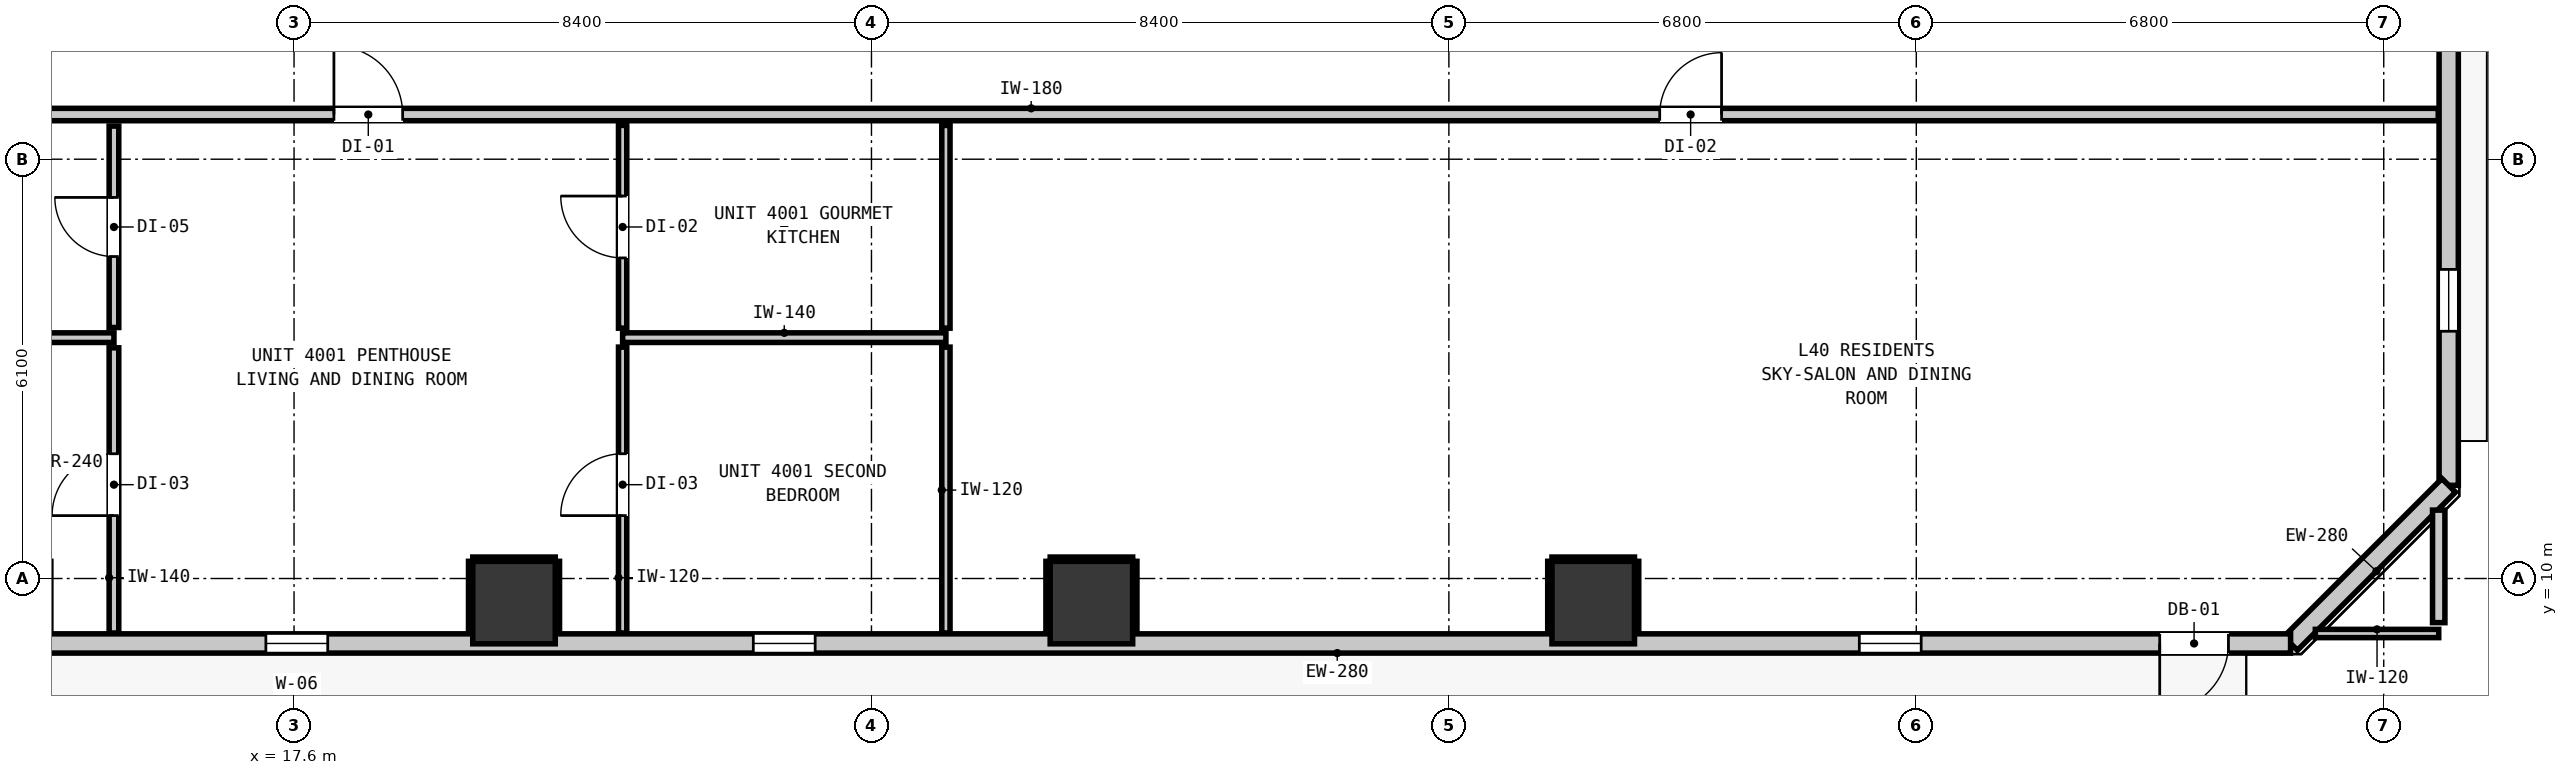
"""IFC4 building model, lengths in metres.
Left out: names, types, materials, properties, quantities, classifications, styles, units other than length and angle.
Written with IfcOpenShell. Run it as: python <this file> out.ifc"""

import sys

from ifc_helpers import new_model, si_unit, direction, frame, frame_2d, origin, origin_2d, place, context, subcontext, project, spatial, rectangle, extrude, element, fill, save


model = new_model("IFC4")
c1 = context("Model", 3, precision=1e-05, world=origin(), true_north=direction((0.0, 1.0)))
c2 = subcontext(c1, "Body", "Model", "MODEL_VIEW")
j1 = project(units=[si_unit("LENGTHUNIT", "METRE"), si_unit("PLANEANGLEUNIT", "RADIAN")], contexts=[c1])
p1 = place(None, origin())
s1 = spatial("IfcSite", under=j1, at=p1, CompositionType="ELEMENT")
p2 = place(p1, origin())
s2 = spatial("IfcBuilding", under=s1, at=p2, CompositionType="ELEMENT")
p3 = place(p2, frame((0.0, 0.0, 139.28)))
s3 = spatial("IfcBuildingStorey", under=s2, at=p3, CompositionType="ELEMENT", Elevation=139.28)
for number, where, z_axis, x_axis in (
    (1, (20.8, 9.65, 0.0), (0.0, 0.0, 1.0), (1.0, 0.0, 0.0)),
    (2, (29.2, 9.65, 0.0), (0.0, 0.0, 1.0), (1.0, 0.0, 0.0)),
    (3, (36.5, 9.65, 0.0), (0.0, 0.0, 1.0), (1.0, 0.0, 0.0)),
):
    element("IfcColumn", number, at=place(p3, frame(where, z_axis=z_axis, x_axis=x_axis)), inside=s3, PredefinedType="COLUMN", context=c2, shape_type="SweptSolid", body=[
        extrude(rectangle(XDim=1.2, YDim=1.2, at=origin_2d()), origin(), (0.0, 0.0, 1.0), 3.32),
    ])
p4 = place(p3, frame((48.945, 43.645, 0.0), z_axis=(0.0, 0.0, 1.0), x_axis=(0.0, -1.0, 0.0)))
e4 = element("IfcWall", 4, at=p4, inside=s3, PredefinedType="STANDARD", context=c2, shape_type="SweptSolid", body=[
    extrude(rectangle(XDim=32.29, YDim=0.28, at=frame_2d((16.145, 0.0))), origin(), (0.0, 0.0, 1.0), 3.08),
])
p5 = place(p4, frame((5.467, 0.0, 0.0)))
e5 = element("IfcOpeningElement", 5, at=p5, cuts=e4, PredefinedType="OPENING", context=c2, shape_type="SweptSolid", body=[
    extrude(rectangle(XDim=1.0, YDim=2.15, at=frame_2d((0.5, 1.075))), frame((0.0, 0.15, 0.0), z_axis=(0.0, -1.0, 0.0), x_axis=(1.0, 0.0, 0.0)), (0.0, 0.0, 1.0), 0.3),
])
p6 = place(p4, frame((29.148, 0.0, 0.85)))
e6 = element("IfcOpeningElement", 6, at=p6, cuts=e4, PredefinedType="OPENING", context=c2, shape_type="SweptSolid", body=[
    extrude(rectangle(XDim=0.9, YDim=1.5, at=frame_2d((0.45, 0.75))), frame((0.0, 0.15, 0.0), z_axis=(0.0, -1.0, 0.0), x_axis=(1.0, 0.0, 0.0)), (0.0, 0.0, 1.0), 0.3),
])
p7 = place(p4, frame((0.393, 0.0, 0.85)))
e7 = element("IfcOpeningElement", 7, at=p7, cuts=e4, PredefinedType="OPENING", context=c2, shape_type="SweptSolid", body=[
    extrude(rectangle(XDim=0.9, YDim=1.5, at=frame_2d((0.45, 0.75))), frame((0.0, 0.15, 0.0), z_axis=(0.0, -1.0, 0.0), x_axis=(1.0, 0.0, 0.0)), (0.0, 0.0, 1.0), 0.3),
])
p8 = place(p4, frame((16.276, 0.0, 0.85)))
e8 = element("IfcOpeningElement", 8, at=p8, cuts=e4, PredefinedType="OPENING", context=c2, shape_type="SweptSolid", body=[
    extrude(rectangle(XDim=0.9, YDim=1.5, at=frame_2d((0.45, 0.75))), frame((0.0, 0.15, 0.0), z_axis=(0.0, -1.0, 0.0), x_axis=(1.0, 0.0, 0.0)), (0.0, 0.0, 1.0), 0.3),
])
p9 = place(p4, frame((10.645, 0.0, 0.85)))
e9 = element("IfcOpeningElement", 9, at=p9, cuts=e4, PredefinedType="OPENING", context=c2, shape_type="SweptSolid", body=[
    extrude(rectangle(XDim=0.9, YDim=1.5, at=frame_2d((0.45, 0.75))), frame((0.0, 0.15, 0.0), z_axis=(0.0, -1.0, 0.0), x_axis=(1.0, 0.0, 0.0)), (0.0, 0.0, 1.0), 0.3),
])
p10 = place(p3, frame((48.945, 11.355, 0.0), z_axis=(0.0, 0.0, 1.0), x_axis=(-0.707106781187, -0.707106781187, 0.0)))
e10 = element("IfcWall", 10, at=p10, inside=s3, PredefinedType="STANDARD", context=c2, shape_type="SweptSolid", body=[
    extrude(rectangle(XDim=3.253, YDim=0.28, at=frame_2d((1.626, 0.0))), origin(), (0.0, 0.0, 1.0), 3.08),
])
p11 = place(p3, frame((46.645, 9.055, 0.0), z_axis=(0.0, 0.0, 1.0), x_axis=(-1.0, 0.0, 0.0)))
e11 = element("IfcWall", 11, at=p11, inside=s3, PredefinedType="STANDARD", context=c2, shape_type="SweptSolid", body=[
    extrude(rectangle(XDim=35.09, YDim=0.28, at=frame_2d((17.545, 0.0))), origin(), (0.0, 0.0, 1.0), 3.08),
])
p12 = place(p11, frame((0.904, 0.0, 0.0)))
e12 = element("IfcOpeningElement", 12, at=p12, cuts=e11, PredefinedType="OPENING", context=c2, shape_type="SweptSolid", body=[
    extrude(rectangle(XDim=1.0, YDim=2.15, at=frame_2d((0.5, 1.075))), frame((0.0, 0.15, 0.0), z_axis=(0.0, -1.0, 0.0), x_axis=(1.0, 0.0, 0.0)), (0.0, 0.0, 1.0), 0.3),
])
p13 = place(p11, frame((28.555, 0.0, 0.85)))
e13 = element("IfcOpeningElement", 13, at=p13, cuts=e11, PredefinedType="OPENING", context=c2, shape_type="SweptSolid", body=[
    extrude(rectangle(XDim=0.9, YDim=1.5, at=frame_2d((0.45, 0.75))), frame((0.0, 0.15, 0.0), z_axis=(0.0, -1.0, 0.0), x_axis=(1.0, 0.0, 0.0)), (0.0, 0.0, 1.0), 0.3),
])
p14 = place(p11, frame((34.133, 0.0, 0.85)))
e14 = element("IfcOpeningElement", 14, at=p14, cuts=e11, PredefinedType="OPENING", context=c2, shape_type="SweptSolid", body=[
    extrude(rectangle(XDim=0.58, YDim=1.5, at=frame_2d((0.29, 0.75))), frame((0.0, 0.15, 0.0), z_axis=(0.0, -1.0, 0.0), x_axis=(1.0, 0.0, 0.0)), (0.0, 0.0, 1.0), 0.3),
])
p15 = place(p11, frame((21.464, 0.0, 0.85)))
e15 = element("IfcOpeningElement", 15, at=p15, cuts=e11, PredefinedType="OPENING", context=c2, shape_type="SweptSolid", body=[
    extrude(rectangle(XDim=0.9, YDim=1.5, at=frame_2d((0.45, 0.75))), frame((0.0, 0.15, 0.0), z_axis=(0.0, -1.0, 0.0), x_axis=(1.0, 0.0, 0.0)), (0.0, 0.0, 1.0), 0.3),
])
p16 = place(p11, frame((5.374, 0.0, 0.85)))
e16 = element("IfcOpeningElement", 16, at=p16, cuts=e11, PredefinedType="OPENING", context=c2, shape_type="SweptSolid", body=[
    extrude(rectangle(XDim=0.9, YDim=1.5, at=frame_2d((0.45, 0.75))), frame((0.0, 0.15, 0.0), z_axis=(0.0, -1.0, 0.0), x_axis=(1.0, 0.0, 0.0)), (0.0, 0.0, 1.0), 0.3),
])
p17 = place(p3, frame((9.407, 16.75, 0.0), z_axis=(0.0, 0.0, 1.0), x_axis=(1.0, 0.0, 0.0)))
e17 = element("IfcWall", 17, at=p17, inside=s3, PredefinedType="PARTITIONING", context=c2, shape_type="SweptSolid", body=[
    extrude(rectangle(XDim=39.386, YDim=0.18, at=frame_2d((19.693, 0.0))), origin(), (0.0, 0.0, 1.0), 3.08),
])
p18 = place(p17, frame((8.773, 0.0, 0.0)))
e18 = element("IfcOpeningElement", 18, at=p18, cuts=e17, PredefinedType="OPENING", context=c2, shape_type="SweptSolid", body=[
    extrude(rectangle(XDim=1.0, YDim=2.15, at=frame_2d((0.5, 1.075))), frame((0.0, 0.1, 0.0), z_axis=(0.0, -1.0, 0.0), x_axis=(1.0, 0.0, 0.0)), (0.0, 0.0, 1.0), 0.2),
])
p19 = place(p17, frame((28.06, 0.0, 0.0)))
e19 = element("IfcOpeningElement", 19, at=p19, cuts=e17, PredefinedType="OPENING", context=c2, shape_type="SweptSolid", body=[
    extrude(rectangle(XDim=0.9, YDim=2.1, at=frame_2d((0.45, 1.05))), frame((0.0, 0.1, 0.0), z_axis=(0.0, -1.0, 0.0), x_axis=(1.0, 0.0, 0.0)), (0.0, 0.0, 1.0), 0.2),
])
p20 = place(p3, frame((9.407, 13.504, 0.0), z_axis=(0.0, 0.0, 1.0), x_axis=(1.0, 0.0, 0.0)))
e20 = element("IfcWall", 20, at=p20, inside=s3, PredefinedType="PARTITIONING", context=c2, shape_type="SweptSolid", body=[
    extrude(rectangle(XDim=5.573, YDim=0.14, at=frame_2d((2.787, 0.0))), origin(), (0.0, 0.0, 1.0), 3.08),
])
p21 = place(p3, frame((22.38, 13.504, 0.0), z_axis=(0.0, 0.0, 1.0), x_axis=(1.0, 0.0, 0.0)))
e21 = element("IfcWall", 21, at=p21, inside=s3, PredefinedType="PARTITIONING", context=c2, shape_type="SweptSolid", body=[
    extrude(rectangle(XDim=4.703, YDim=0.14, at=frame_2d((2.352, 0.0))), origin(), (0.0, 0.0, 1.0), 3.08),
])
p22 = place(p3, frame((47.005, 9.2, 0.0), z_axis=(0.0, 0.0, 1.0), x_axis=(1.0, 0.0, 0.0)))
e22 = element("IfcWall", 22, at=p22, inside=s3, PredefinedType="PARTITIONING", context=c2, shape_type="SweptSolid", body=[
    extrude(rectangle(XDim=1.795, YDim=0.12, at=frame_2d((0.897, 0.0))), origin(), (0.0, 0.0, 1.0), 3.08),
])
p23 = place(p3, frame((48.8, 9.358, 0.0), z_axis=(0.0, 0.0, 1.0), x_axis=(0.0, 1.0, 0.0)))
e23 = element("IfcWall", 23, at=p23, inside=s3, PredefinedType="PARTITIONING", context=c2, shape_type="SweptSolid", body=[
    extrude(rectangle(XDim=1.637, YDim=0.18, at=frame_2d((0.819, 0.0))), origin(), (0.0, 0.0, 1.0), 3.08),
])
p24 = place(p3, frame((14.98, 9.207, 0.0), z_axis=(0.0, 0.0, 1.0), x_axis=(0.0, 1.0, 0.0)))
e24 = element("IfcWall", 24, at=p24, inside=s3, PredefinedType="PARTITIONING", context=c2, shape_type="SweptSolid", body=[
    extrude(rectangle(XDim=4.149, YDim=0.14, at=frame_2d((2.074, 0.0))), origin(), (0.0, 0.0, 1.0), 3.08),
])
p25 = place(p24, frame((1.708, 0.0, 0.0)))
e25 = element("IfcOpeningElement", 25, at=p25, cuts=e24, PredefinedType="OPENING", context=c2, shape_type="SweptSolid", body=[
    extrude(rectangle(XDim=0.9, YDim=2.1, at=frame_2d((0.45, 1.05))), frame((0.0, 0.08, 0.0), z_axis=(0.0, -1.0, 0.0), x_axis=(1.0, 0.0, 0.0)), (0.0, 0.0, 1.0), 0.16),
])
p26 = place(p3, frame((14.98, 13.652, 0.0), z_axis=(0.0, 0.0, 1.0), x_axis=(0.0, 1.0, 0.0)))
e26 = element("IfcWall", 26, at=p26, inside=s3, PredefinedType="PARTITIONING", context=c2, shape_type="SweptSolid", body=[
    extrude(rectangle(XDim=2.93, YDim=0.14, at=frame_2d((1.465, 0.0))), origin(), (0.0, 0.0, 1.0), 3.08),
])
p27 = place(p26, frame((1.032, 0.0, 0.0)))
e27 = element("IfcOpeningElement", 27, at=p27, cuts=e26, PredefinedType="OPENING", context=c2, shape_type="SweptSolid", body=[
    extrude(rectangle(XDim=0.86, YDim=2.02, at=frame_2d((0.43, 1.01))), frame((0.0, 0.08, 0.0), z_axis=(0.0, -1.0, 0.0), x_axis=(1.0, 0.0, 0.0)), (0.0, 0.0, 1.0), 0.16),
])
p28 = place(p3, frame((22.38, 9.207, 0.0), z_axis=(0.0, 0.0, 1.0), x_axis=(0.0, 1.0, 0.0)))
e28 = element("IfcWall", 28, at=p28, inside=s3, PredefinedType="PARTITIONING", context=c2, shape_type="SweptSolid", body=[
    extrude(rectangle(XDim=4.159, YDim=0.12, at=frame_2d((2.08, 0.0))), origin(), (0.0, 0.0, 1.0), 3.08),
])
p29 = place(p28, frame((1.708, 0.0, 0.0)))
e29 = element("IfcOpeningElement", 29, at=p29, cuts=e28, PredefinedType="OPENING", context=c2, shape_type="SweptSolid", body=[
    extrude(rectangle(XDim=0.9, YDim=2.1, at=frame_2d((0.45, 1.05))), frame((0.0, 0.07, 0.0), z_axis=(0.0, -1.0, 0.0), x_axis=(1.0, 0.0, 0.0)), (0.0, 0.0, 1.0), 0.14),
])
p30 = place(p3, frame((22.38, 13.642, 0.0), z_axis=(0.0, 0.0, 1.0), x_axis=(0.0, 1.0, 0.0)))
e30 = element("IfcWall", 30, at=p30, inside=s3, PredefinedType="PARTITIONING", context=c2, shape_type="SweptSolid", body=[
    extrude(rectangle(XDim=2.95, YDim=0.12, at=frame_2d((1.475, 0.0))), origin(), (0.0, 0.0, 1.0), 3.08),
])
p31 = place(p30, frame((1.022, 0.0, 0.0)))
e31 = element("IfcOpeningElement", 31, at=p31, cuts=e30, PredefinedType="OPENING", context=c2, shape_type="SweptSolid", body=[
    extrude(rectangle(XDim=0.9, YDim=2.1, at=frame_2d((0.45, 1.05))), frame((0.0, 0.07, 0.0), z_axis=(0.0, -1.0, 0.0), x_axis=(1.0, 0.0, 0.0)), (0.0, 0.0, 1.0), 0.14),
])
p32 = place(p3, frame((27.083, 9.207, 0.0), z_axis=(0.0, 0.0, 1.0), x_axis=(0.0, 1.0, 0.0)))
e32 = element("IfcWall", 32, at=p32, inside=s3, PredefinedType="PARTITIONING", context=c2, shape_type="SweptSolid", body=[
    extrude(rectangle(XDim=4.159, YDim=0.12, at=frame_2d((2.08, 0.0))), origin(), (0.0, 0.0, 1.0), 3.08),
])
p33 = place(p3, frame((27.083, 13.642, 0.0), z_axis=(0.0, 0.0, 1.0), x_axis=(0.0, 1.0, 0.0)))
e33 = element("IfcWall", 33, at=p33, inside=s3, PredefinedType="PARTITIONING", context=c2, shape_type="SweptSolid", body=[
    extrude(rectangle(XDim=2.95, YDim=0.12, at=frame_2d((1.475, 0.0))), origin(), (0.0, 0.0, 1.0), 3.08),
])
p34 = place(p3, frame((20.2, 10.282, 0.0), z_axis=(0.0, 0.0, 1.0), x_axis=(1.0, 0.0, 0.0)))
e34 = element("IfcWall", 34, at=p34, inside=s3, PredefinedType="PARTITIONING", context=c2, shape_type="SweptSolid", body=[
    extrude(rectangle(XDim=1.2, YDim=0.06, at=frame_2d((0.6, 0.0))), origin(), (0.0, 0.0, 1.0), 1.45),
])
for number, where, z_axis, x_axis in (
    (35, (20.168, 9.21, 0.0), (0.0, 0.0, 1.0), (0.0, 1.0, 0.0)),
    (36, (21.432, 9.21, 0.0), (0.0, 0.0, 1.0), (0.0, 1.0, 0.0)),
):
    element("IfcWall", number, at=place(p3, frame(where, z_axis=z_axis, x_axis=x_axis)), inside=s3, PredefinedType="PARTITIONING", context=c2, shape_type="SweptSolid", body=[
        extrude(rectangle(XDim=1.04, YDim=0.06, at=frame_2d((0.52, 0.0))), origin(), (0.0, 0.0, 1.0), 1.45),
    ])
p35 = place(p3, frame((28.6, 10.282, 0.0), z_axis=(0.0, 0.0, 1.0), x_axis=(1.0, 0.0, 0.0)))
e37 = element("IfcWall", 37, at=p35, inside=s3, PredefinedType="PARTITIONING", context=c2, shape_type="SweptSolid", body=[
    extrude(rectangle(XDim=1.2, YDim=0.06, at=frame_2d((0.6, 0.0))), origin(), (0.0, 0.0, 1.0), 1.45),
])
for number, where, z_axis, x_axis in (
    (38, (28.568, 9.21, 0.0), (0.0, 0.0, 1.0), (0.0, 1.0, 0.0)),
    (39, (29.832, 9.21, 0.0), (0.0, 0.0, 1.0), (0.0, 1.0, 0.0)),
):
    element("IfcWall", number, at=place(p3, frame(where, z_axis=z_axis, x_axis=x_axis)), inside=s3, PredefinedType="PARTITIONING", context=c2, shape_type="SweptSolid", body=[
        extrude(rectangle(XDim=1.04, YDim=0.06, at=frame_2d((0.52, 0.0))), origin(), (0.0, 0.0, 1.0), 1.45),
    ])
p36 = place(p3, frame((35.9, 10.282, 0.0), z_axis=(0.0, 0.0, 1.0), x_axis=(1.0, 0.0, 0.0)))
e40 = element("IfcWall", 40, at=p36, inside=s3, PredefinedType="PARTITIONING", context=c2, shape_type="SweptSolid", body=[
    extrude(rectangle(XDim=1.2, YDim=0.06, at=frame_2d((0.6, 0.0))), origin(), (0.0, 0.0, 1.0), 1.45),
])
for number, where, z_axis, x_axis in (
    (41, (35.868, 9.21, 0.0), (0.0, 0.0, 1.0), (0.0, 1.0, 0.0)),
    (42, (37.132, 9.21, 0.0), (0.0, 0.0, 1.0), (0.0, 1.0, 0.0)),
):
    element("IfcWall", number, at=place(p3, frame(where, z_axis=z_axis, x_axis=x_axis)), inside=s3, PredefinedType="PARTITIONING", context=c2, shape_type="SweptSolid", body=[
        extrude(rectangle(XDim=1.04, YDim=0.06, at=frame_2d((0.52, 0.0))), origin(), (0.0, 0.0, 1.0), 1.45),
    ])
p37 = place(p12, origin())
e43 = element("IfcDoor", 43, at=p37, inside=s3, OperationType="SINGLE_SWING_RIGHT", PredefinedType="DOOR", context=c2, shape_type="SweptSolid", body=[
    extrude(rectangle(XDim=1.0, YDim=2.15, at=frame_2d((0.5, 1.075))), frame((0.0, 0.025, 0.0), z_axis=(0.0, -1.0, 0.0), x_axis=(1.0, 0.0, 0.0)), (0.0, 0.0, 1.0), 0.05),
])
fill(e12, e43)
p38 = place(p6, origin())
e44 = element("IfcWindow", 44, at=p38, inside=s3, PartitioningType="SINGLE_PANEL", PredefinedType="WINDOW", context=c2, shape_type="SweptSolid", body=[
    extrude(rectangle(XDim=0.9, YDim=1.5, at=frame_2d((0.45, 0.75))), frame((0.0, 0.03, 0.0), z_axis=(0.0, -1.0, 0.0), x_axis=(1.0, 0.0, 0.0)), (0.0, 0.0, 1.0), 0.06),
])
fill(e6, e44)
p39 = place(p13, origin())
e45 = element("IfcWindow", 45, at=p39, inside=s3, PartitioningType="SINGLE_PANEL", PredefinedType="WINDOW", context=c2, shape_type="SweptSolid", body=[
    extrude(rectangle(XDim=0.9, YDim=1.5, at=frame_2d((0.45, 0.75))), frame((0.0, 0.03, 0.0), z_axis=(0.0, -1.0, 0.0), x_axis=(1.0, 0.0, 0.0)), (0.0, 0.0, 1.0), 0.06),
])
fill(e13, e45)
p40 = place(p15, origin())
e46 = element("IfcWindow", 46, at=p40, inside=s3, PartitioningType="SINGLE_PANEL", PredefinedType="WINDOW", context=c2, shape_type="SweptSolid", body=[
    extrude(rectangle(XDim=0.9, YDim=1.5, at=frame_2d((0.45, 0.75))), frame((0.0, 0.03, 0.0), z_axis=(0.0, -1.0, 0.0), x_axis=(1.0, 0.0, 0.0)), (0.0, 0.0, 1.0), 0.06),
])
fill(e15, e46)
p41 = place(p16, origin())
e47 = element("IfcWindow", 47, at=p41, inside=s3, PartitioningType="SINGLE_PANEL", PredefinedType="WINDOW", context=c2, shape_type="SweptSolid", body=[
    extrude(rectangle(XDim=0.9, YDim=1.5, at=frame_2d((0.45, 0.75))), frame((0.0, 0.03, 0.0), z_axis=(0.0, -1.0, 0.0), x_axis=(1.0, 0.0, 0.0)), (0.0, 0.0, 1.0), 0.06),
])
fill(e16, e47)
p42 = place(p18, origin())
e48 = element("IfcDoor", 48, at=p42, inside=s3, OperationType="SINGLE_SWING_LEFT", PredefinedType="DOOR", context=c2, shape_type="SweptSolid", body=[
    extrude(rectangle(XDim=1.0, YDim=2.15, at=frame_2d((0.5, 1.075))), frame((0.0, 0.025, 0.0), z_axis=(0.0, -1.0, 0.0), x_axis=(1.0, 0.0, 0.0)), (0.0, 0.0, 1.0), 0.05),
])
fill(e18, e48)
p43 = place(p27, origin())
e49 = element("IfcDoor", 49, at=p43, inside=s3, OperationType="SINGLE_SWING_RIGHT", PredefinedType="DOOR", context=c2, shape_type="SweptSolid", body=[
    extrude(rectangle(XDim=0.86, YDim=2.02, at=frame_2d((0.43, 1.01))), frame((0.0, 0.025, 0.0), z_axis=(0.0, -1.0, 0.0), x_axis=(1.0, 0.0, 0.0)), (0.0, 0.0, 1.0), 0.05),
])
fill(e27, e49)
p44 = place(p25, origin())
e50 = element("IfcDoor", 50, at=p44, inside=s3, OperationType="SINGLE_SWING_LEFT", PredefinedType="DOOR", context=c2, shape_type="SweptSolid", body=[
    extrude(rectangle(XDim=0.9, YDim=2.1, at=frame_2d((0.45, 1.05))), frame((0.0, 0.025, 0.0), z_axis=(0.0, -1.0, 0.0), x_axis=(1.0, 0.0, 0.0)), (0.0, 0.0, 1.0), 0.05),
])
fill(e25, e50)
p45 = place(p31, origin())
e51 = element("IfcDoor", 51, at=p45, inside=s3, OperationType="SINGLE_SWING_RIGHT", PredefinedType="DOOR", context=c2, shape_type="SweptSolid", body=[
    extrude(rectangle(XDim=0.9, YDim=2.1, at=frame_2d((0.45, 1.05))), frame((0.0, 0.025, 0.0), z_axis=(0.0, -1.0, 0.0), x_axis=(1.0, 0.0, 0.0)), (0.0, 0.0, 1.0), 0.05),
])
fill(e31, e51)
p46 = place(p29, origin())
e52 = element("IfcDoor", 52, at=p46, inside=s3, OperationType="SINGLE_SWING_LEFT", PredefinedType="DOOR", context=c2, shape_type="SweptSolid", body=[
    extrude(rectangle(XDim=0.9, YDim=2.1, at=frame_2d((0.45, 1.05))), frame((0.0, 0.025, 0.0), z_axis=(0.0, -1.0, 0.0), x_axis=(1.0, 0.0, 0.0)), (0.0, 0.0, 1.0), 0.05),
])
fill(e29, e52)
p47 = place(p19, origin())
e53 = element("IfcDoor", 53, at=p47, inside=s3, OperationType="SINGLE_SWING_RIGHT", PredefinedType="DOOR", context=c2, shape_type="SweptSolid", body=[
    extrude(rectangle(XDim=0.9, YDim=2.1, at=frame_2d((0.45, 1.05))), frame((0.0, 0.025, 0.0), z_axis=(0.0, -1.0, 0.0), x_axis=(1.0, 0.0, 0.0)), (0.0, 0.0, 1.0), 0.05),
])
fill(e19, e53)
save(model, sys.argv[1])
